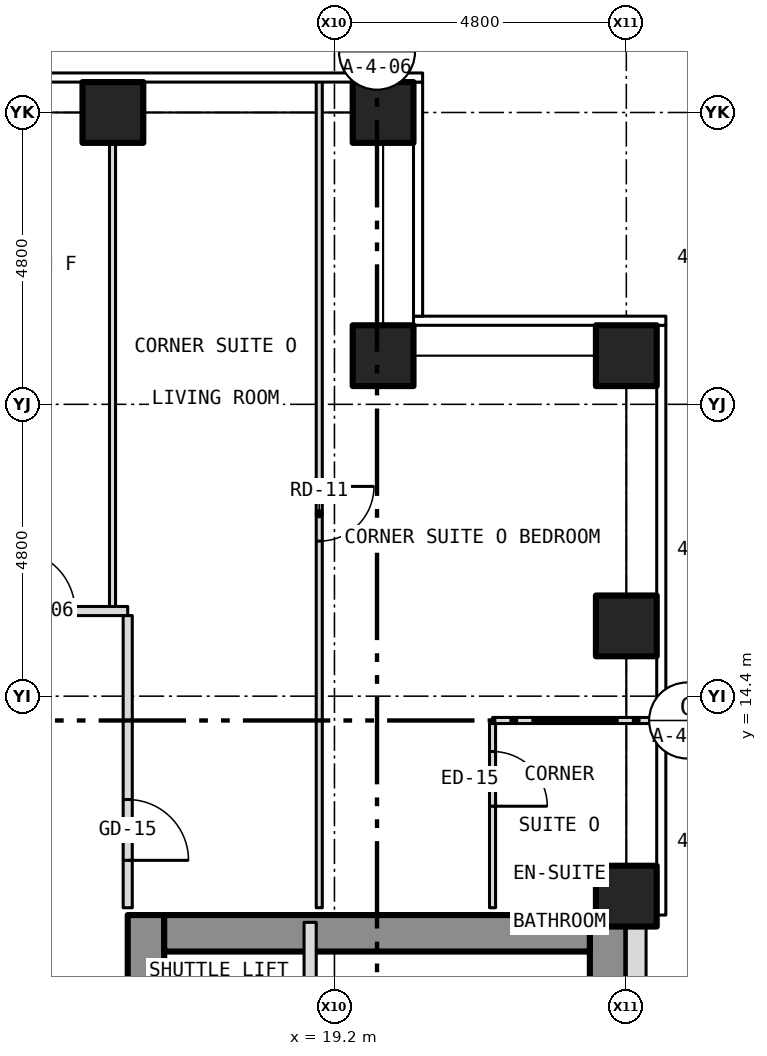
"""IFC4 building model, lengths in metres.
Left out: names, types, materials, properties, quantities, classifications, styles, units other than length and angle.
Written with IfcOpenShell. Run it as: python <this file> out.ifc"""

import sys

from ifc_helpers import new_model, si_unit, direction, frame, frame_2d, origin, origin_2d, place, context, subcontext, project, spatial, rectangle, hollow_rectangle, extrude, element, fill, save


model = new_model("IFC4")
c1 = context("Model", 3, precision=1e-05, world=origin(), true_north=direction((0.0, 1.0)))
c2 = subcontext(c1, "Body", "Model", "MODEL_VIEW")
j1 = project(units=[si_unit("LENGTHUNIT", "METRE"), si_unit("PLANEANGLEUNIT", "RADIAN")], contexts=[c1])
p1 = place(None, origin())
s1 = spatial("IfcSite", under=j1, at=p1, CompositionType="ELEMENT")
p2 = place(p1, origin())
s2 = spatial("IfcBuilding", under=s1, at=p2, CompositionType="ELEMENT")
p3 = place(p2, frame((0.0, 0.0, 56.5)))
s3 = spatial("IfcBuildingStorey", under=s2, at=p3, CompositionType="ELEMENT", Elevation=56.5)
for number, where, z_axis, x_axis in (
    (1, (15.556, 24.0, -0.15), (0.0, 0.0, 1.0), (1.0, 0.0, 0.0)),
    (2, (20.0, 24.0, -0.15), (0.0, 0.0, 1.0), (1.0, 0.0, 0.0)),
    (3, (24.0, 11.111, -0.15), (0.0, 0.0, 1.0), (1.0, 0.0, 0.0)),
    (4, (24.0, 15.556, -0.15), (0.0, 0.0, 1.0), (1.0, 0.0, 0.0)),
    (5, (24.0, 20.0, -0.15), (0.0, 0.0, 1.0), (1.0, 0.0, 0.0)),
    (6, (20.0, 20.0, -0.15), (0.0, 0.0, 1.0), (1.0, 0.0, 0.0)),
):
    element("IfcColumn", number, at=place(p3, frame(where, z_axis=z_axis, x_axis=x_axis)), inside=s3, PredefinedType="COLUMN", context=c2, shape_type="SweptSolid", body=[
        extrude(hollow_rectangle(XDim=1.0, YDim=1.0, WallThickness=0.06, at=origin_2d()), origin(), (0.0, 0.0, 1.0), 3.5),
    ])
p4 = place(p3, frame((16.1, -10.8, 0.0), z_axis=(0.0, 0.0, 1.0), x_axis=(0.0, 1.0, 0.0)))
e7 = element("IfcWall", 7, at=p4, inside=s3, PredefinedType="SHEAR", context=c2, shape_type="SweptSolid", body=[
    extrude(rectangle(XDim=21.6, YDim=0.6, at=frame_2d((10.8, 0.0))), origin(), (0.0, 0.0, 1.0), 3.25),
])
p5 = place(p4, frame((9.4, 0.0, 0.0)))
e8 = element("IfcOpeningElement", 8, at=p5, cuts=e7, PredefinedType="OPENING", context=c2, shape_type="SweptSolid", body=[
    extrude(rectangle(XDim=1.1, YDim=2.1, at=frame_2d((0.55, 1.05))), frame((0.0, 0.312, 0.0), z_axis=(0.0, -1.0, 0.0), x_axis=(1.0, 0.0, 0.0)), (0.0, 0.0, 1.0), 0.624),
])
p6 = place(p4, frame((11.5, 0.0, 0.0)))
e9 = element("IfcOpeningElement", 9, at=p6, cuts=e7, PredefinedType="OPENING", context=c2, shape_type="SweptSolid", body=[
    extrude(rectangle(XDim=1.1, YDim=2.1, at=frame_2d((0.55, 1.05))), frame((0.0, 0.312, 0.0), z_axis=(0.0, -1.0, 0.0), x_axis=(1.0, 0.0, 0.0)), (0.0, 0.0, 1.0), 0.624),
])
p7 = place(p4, frame((13.6, 0.0, 0.0)))
e10 = element("IfcOpeningElement", 10, at=p7, cuts=e7, PredefinedType="OPENING", context=c2, shape_type="SweptSolid", body=[
    extrude(rectangle(XDim=1.1, YDim=2.1, at=frame_2d((0.55, 1.05))), frame((0.0, 0.312, 0.0), z_axis=(0.0, -1.0, 0.0), x_axis=(1.0, 0.0, 0.0)), (0.0, 0.0, 1.0), 0.624),
])
p8 = place(p4, frame((15.7, 0.0, 0.0)))
e11 = element("IfcOpeningElement", 11, at=p8, cuts=e7, PredefinedType="OPENING", context=c2, shape_type="SweptSolid", body=[
    extrude(rectangle(XDim=1.1, YDim=2.1, at=frame_2d((0.55, 1.05))), frame((0.0, 0.312, 0.0), z_axis=(0.0, -1.0, 0.0), x_axis=(1.0, 0.0, 0.0)), (0.0, 0.0, 1.0), 0.624),
])
p9 = place(p4, frame((17.8, 0.0, 0.0)))
e12 = element("IfcOpeningElement", 12, at=p9, cuts=e7, PredefinedType="OPENING", context=c2, shape_type="SweptSolid", body=[
    extrude(rectangle(XDim=1.1, YDim=2.1, at=frame_2d((0.55, 1.05))), frame((0.0, 0.312, 0.0), z_axis=(0.0, -1.0, 0.0), x_axis=(1.0, 0.0, 0.0)), (0.0, 0.0, 1.0), 0.624),
])
p10 = place(p4, frame((5.642, 0.0, 0.0)))
e13 = element("IfcOpeningElement", 13, at=p10, cuts=e7, PredefinedType="OPENING", context=c2, shape_type="SweptSolid", body=[
    extrude(rectangle(XDim=1.1, YDim=2.1, at=frame_2d((0.55, 1.05))), frame((0.0, 0.312, 0.0), z_axis=(0.0, -1.0, 0.0), x_axis=(1.0, 0.0, 0.0)), (0.0, 0.0, 1.0), 0.624),
])
p11 = place(p4, frame((7.5, 0.0, 0.0)))
e14 = element("IfcOpeningElement", 14, at=p11, cuts=e7, PredefinedType="OPENING", context=c2, shape_type="SweptSolid", body=[
    extrude(rectangle(XDim=1.1, YDim=2.1, at=frame_2d((0.55, 1.05))), frame((0.0, 0.312, 0.0), z_axis=(0.0, -1.0, 0.0), x_axis=(1.0, 0.0, 0.0)), (0.0, 0.0, 1.0), 0.624),
])
p12 = place(p3, frame((23.7, -10.8, 0.0), z_axis=(0.0, 0.0, 1.0), x_axis=(0.0, 1.0, 0.0)))
e15 = element("IfcWall", 15, at=p12, inside=s3, PredefinedType="SHEAR", context=c2, shape_type="SweptSolid", body=[
    extrude(rectangle(XDim=21.6, YDim=0.6, at=frame_2d((10.8, 0.0))), origin(), (0.0, 0.0, 1.0), 3.25),
])
p13 = place(p3, frame((16.4, 10.5, 0.0), z_axis=(0.0, 0.0, 1.0), x_axis=(1.0, 0.0, 0.0)))
e16 = element("IfcWall", 16, at=p13, inside=s3, PredefinedType="SHEAR", context=c2, shape_type="SweptSolid", body=[
    extrude(rectangle(XDim=7.0, YDim=0.6, at=frame_2d((3.5, 0.0))), origin(), (0.0, 0.0, 1.0), 3.25),
])
p14 = place(p3, frame((24.163, -10.8, 0.0), z_axis=(0.0, 0.0, 1.0), x_axis=(0.0, 1.0, 0.0)))
e17 = element("IfcWall", 17, at=p14, inside=s3, PredefinedType="SOLIDWALL", context=c2, shape_type="SweptSolid", body=[
    extrude(rectangle(XDim=21.6, YDim=0.325, at=frame_2d((10.8, 0.0))), origin(), (0.0, 0.0, 1.0), 3.5),
])
p15 = place(p14, frame((2.95, 0.0, 1.0)))
e18 = element("IfcOpeningElement", 18, at=p15, cuts=e17, PredefinedType="OPENING", context=c2, shape_type="SweptSolid", body=[
    extrude(rectangle(XDim=0.6, YDim=1.5, at=frame_2d((0.3, 0.75))), frame((0.0, 0.175, 0.0), z_axis=(0.0, -1.0, 0.0), x_axis=(1.0, 0.0, 0.0)), (0.0, 0.0, 1.0), 0.349),
])
p16 = place(p3, frame((21.8, 14.0, 0.0), z_axis=(0.0, 0.0, 1.0), x_axis=(1.0, 0.0, 0.0)))
e19 = element("IfcWall", 19, at=p16, inside=s3, PredefinedType="PARTITIONING", context=c2, shape_type="SweptSolid", body=[
    extrude(rectangle(XDim=2.73, YDim=0.1, at=frame_2d((1.365, 0.0))), origin(), (0.0, 0.0, 1.0), 3.35),
])
p17 = place(p3, frame((-15.8, 15.8, 0.0), z_axis=(0.0, 0.0, 1.0), x_axis=(1.0, 0.0, 0.0)))
e20 = element("IfcWall", 20, at=p17, inside=s3, PredefinedType="PARTITIONING", context=c2, shape_type="SweptSolid", body=[
    extrude(rectangle(XDim=31.6, YDim=0.15, at=frame_2d((15.8, 0.0))), origin(), (0.0, 0.0, 1.0), 3.35),
])
p18 = place(p17, frame((4.178, 0.0, 0.0)))
e21 = element("IfcOpeningElement", 21, at=p18, cuts=e20, PredefinedType="OPENING", context=c2, shape_type="SweptSolid", body=[
    extrude(rectangle(XDim=1.0, YDim=2.1, at=frame_2d((0.5, 1.05))), frame((0.0, 0.087, 0.0), z_axis=(0.0, -1.0, 0.0), x_axis=(1.0, 0.0, 0.0)), (0.0, 0.0, 1.0), 0.174),
])
p19 = place(p17, frame((9.734, 0.0, 0.0)))
e22 = element("IfcOpeningElement", 22, at=p19, cuts=e20, PredefinedType="OPENING", context=c2, shape_type="SweptSolid", body=[
    extrude(rectangle(XDim=1.0, YDim=2.1, at=frame_2d((0.5, 1.05))), frame((0.0, 0.087, 0.0), z_axis=(0.0, -1.0, 0.0), x_axis=(1.0, 0.0, 0.0)), (0.0, 0.0, 1.0), 0.174),
])
p20 = place(p17, frame((14.178, 0.0, 0.0)))
e23 = element("IfcOpeningElement", 23, at=p20, cuts=e20, PredefinedType="OPENING", context=c2, shape_type="SweptSolid", body=[
    extrude(rectangle(XDim=1.0, YDim=2.1, at=frame_2d((0.5, 1.05))), frame((0.0, 0.087, 0.0), z_axis=(0.0, -1.0, 0.0), x_axis=(1.0, 0.0, 0.0)), (0.0, 0.0, 1.0), 0.174),
])
p21 = place(p17, frame((17.534, 0.0, 0.0)))
e24 = element("IfcOpeningElement", 24, at=p21, cuts=e20, PredefinedType="OPENING", context=c2, shape_type="SweptSolid", body=[
    extrude(rectangle(XDim=1.0, YDim=2.1, at=frame_2d((0.5, 1.05))), frame((0.0, 0.087, 0.0), z_axis=(0.0, -1.0, 0.0), x_axis=(1.0, 0.0, 0.0)), (0.0, 0.0, 1.0), 0.174),
])
p22 = place(p17, frame((25.289, 0.0, 0.0)))
e25 = element("IfcOpeningElement", 25, at=p22, cuts=e20, PredefinedType="OPENING", context=c2, shape_type="SweptSolid", body=[
    extrude(rectangle(XDim=1.0, YDim=2.1, at=frame_2d((0.5, 1.05))), frame((0.0, 0.087, 0.0), z_axis=(0.0, -1.0, 0.0), x_axis=(1.0, 0.0, 0.0)), (0.0, 0.0, 1.0), 0.174),
])
p23 = place(p17, frame((29.733, 0.0, 0.0)))
e26 = element("IfcOpeningElement", 26, at=p23, cuts=e20, PredefinedType="OPENING", context=c2, shape_type="SweptSolid", body=[
    extrude(rectangle(XDim=1.0, YDim=2.1, at=frame_2d((0.5, 1.05))), frame((0.0, 0.087, 0.0), z_axis=(0.0, -1.0, 0.0), x_axis=(1.0, 0.0, 0.0)), (0.0, 0.0, 1.0), 0.174),
])
p24 = place(p3, frame((15.55, 15.875, 0.0), z_axis=(0.0, 0.0, 1.0), x_axis=(0.0, 1.0, 0.0)))
e27 = element("IfcWall", 27, at=p24, inside=s3, PredefinedType="PARTITIONING", context=c2, shape_type="SweptSolid", body=[
    extrude(rectangle(XDim=8.005, YDim=0.1, at=frame_2d((4.002, 0.0))), origin(), (0.0, 0.0, 1.0), 3.35),
])
p25 = place(p3, frame((15.8, 10.92, 0.0), z_axis=(0.0, 0.0, 1.0), x_axis=(0.0, 1.0, 0.0)))
e28 = element("IfcWall", 28, at=p25, inside=s3, PredefinedType="PARTITIONING", context=c2, shape_type="SweptSolid", body=[
    extrude(rectangle(XDim=4.805, YDim=0.15, at=frame_2d((2.403, 0.0))), origin(), (0.0, 0.0, 1.0), 3.35),
])
p26 = place(p25, frame((0.78, 0.0, 0.0)))
e29 = element("IfcOpeningElement", 29, at=p26, cuts=e28, PredefinedType="OPENING", context=c2, shape_type="SweptSolid", body=[
    extrude(rectangle(XDim=1.0, YDim=2.1, at=frame_2d((0.5, 1.05))), frame((0.0, 0.087, 0.0), z_axis=(0.0, -1.0, 0.0), x_axis=(1.0, 0.0, 0.0)), (0.0, 0.0, 1.0), 0.174),
])
p27 = place(p3, frame((18.8, 4.45, 0.0), z_axis=(0.0, 0.0, 1.0), x_axis=(0.0, 1.0, 0.0)))
e30 = element("IfcWall", 30, at=p27, inside=s3, PredefinedType="PARTITIONING", context=c2, shape_type="SweptSolid", body=[
    extrude(rectangle(XDim=6.23, YDim=0.2, at=frame_2d((3.115, 0.0))), origin(), (0.0, 0.0, 1.0), 3.25),
])
p28 = place(p3, frame((18.95, 10.92, 0.0), z_axis=(0.0, 0.0, 1.0), x_axis=(0.0, 1.0, 0.0)))
e31 = element("IfcWall", 31, at=p28, inside=s3, PredefinedType="PARTITIONING", context=c2, shape_type="SweptSolid", body=[
    extrude(rectangle(XDim=13.61, YDim=0.1, at=frame_2d((6.805, 0.0))), origin(), (0.0, 0.0, 1.0), 3.35),
])
p29 = place(p28, frame((6.03, 0.0, 0.0)))
e32 = element("IfcOpeningElement", 32, at=p29, cuts=e31, PredefinedType="OPENING", context=c2, shape_type="SweptSolid", body=[
    extrude(rectangle(XDim=0.9, YDim=2.1, at=frame_2d((0.45, 1.05))), frame((0.0, 0.062, 0.0), z_axis=(0.0, -1.0, 0.0), x_axis=(1.0, 0.0, 0.0)), (0.0, 0.0, 1.0), 0.124),
])
p30 = place(p3, frame((21.8, 10.92, 0.0), z_axis=(0.0, 0.0, 1.0), x_axis=(0.0, 1.0, 0.0)))
e33 = element("IfcWall", 33, at=p30, inside=s3, PredefinedType="PARTITIONING", context=c2, shape_type="SweptSolid", body=[
    extrude(rectangle(XDim=3.03, YDim=0.1, at=frame_2d((1.515, 0.0))), origin(), (0.0, 0.0, 1.0), 3.35),
])
p31 = place(p30, frame((1.67, 0.0, 0.0)))
e34 = element("IfcOpeningElement", 34, at=p31, cuts=e33, PredefinedType="OPENING", context=c2, shape_type="SweptSolid", body=[
    extrude(rectangle(XDim=0.9, YDim=2.1, at=frame_2d((0.45, 1.05))), frame((0.0, 0.062, 0.0), z_axis=(0.0, -1.0, 0.0), x_axis=(1.0, 0.0, 0.0)), (0.0, 0.0, 1.0), 0.124),
])
p32 = place(p23, origin())
e35 = element("IfcDoor", 35, at=p32, inside=s3, OperationType="SINGLE_SWING_LEFT", PredefinedType="DOOR", context=c2, shape_type="SweptSolid", body=[
    extrude(rectangle(XDim=1.0, YDim=2.1, at=frame_2d((0.5, 1.05))), frame((0.0, 0.025, 0.0), z_axis=(0.0, -1.0, 0.0), x_axis=(1.0, 0.0, 0.0)), (0.0, 0.0, 1.0), 0.05),
])
fill(e26, e35)
p33 = place(p26, origin())
e36 = element("IfcDoor", 36, at=p33, inside=s3, OperationType="SINGLE_SWING_LEFT", PredefinedType="DOOR", context=c2, shape_type="SweptSolid", body=[
    extrude(rectangle(XDim=1.0, YDim=2.1, at=frame_2d((0.5, 1.05))), frame((0.0, 0.025, 0.0), z_axis=(0.0, -1.0, 0.0), x_axis=(1.0, 0.0, 0.0)), (0.0, 0.0, 1.0), 0.05),
])
fill(e29, e36)
p34 = place(p29, origin())
e37 = element("IfcDoor", 37, at=p34, inside=s3, OperationType="SINGLE_SWING_RIGHT", PredefinedType="DOOR", context=c2, shape_type="SweptSolid", body=[
    extrude(rectangle(XDim=0.9, YDim=2.1, at=frame_2d((0.45, 1.05))), frame((0.0, 0.025, 0.0), z_axis=(0.0, -1.0, 0.0), x_axis=(1.0, 0.0, 0.0)), (0.0, 0.0, 1.0), 0.05),
])
fill(e32, e37)
p35 = place(p31, origin())
e38 = element("IfcDoor", 38, at=p35, inside=s3, OperationType="SINGLE_SWING_LEFT", PredefinedType="DOOR", context=c2, shape_type="SweptSolid", body=[
    extrude(rectangle(XDim=0.9, YDim=2.1, at=frame_2d((0.45, 1.05))), frame((0.0, 0.025, 0.0), z_axis=(0.0, -1.0, 0.0), x_axis=(1.0, 0.0, 0.0)), (0.0, 0.0, 1.0), 0.05),
])
fill(e34, e38)
save(model, sys.argv[1])
